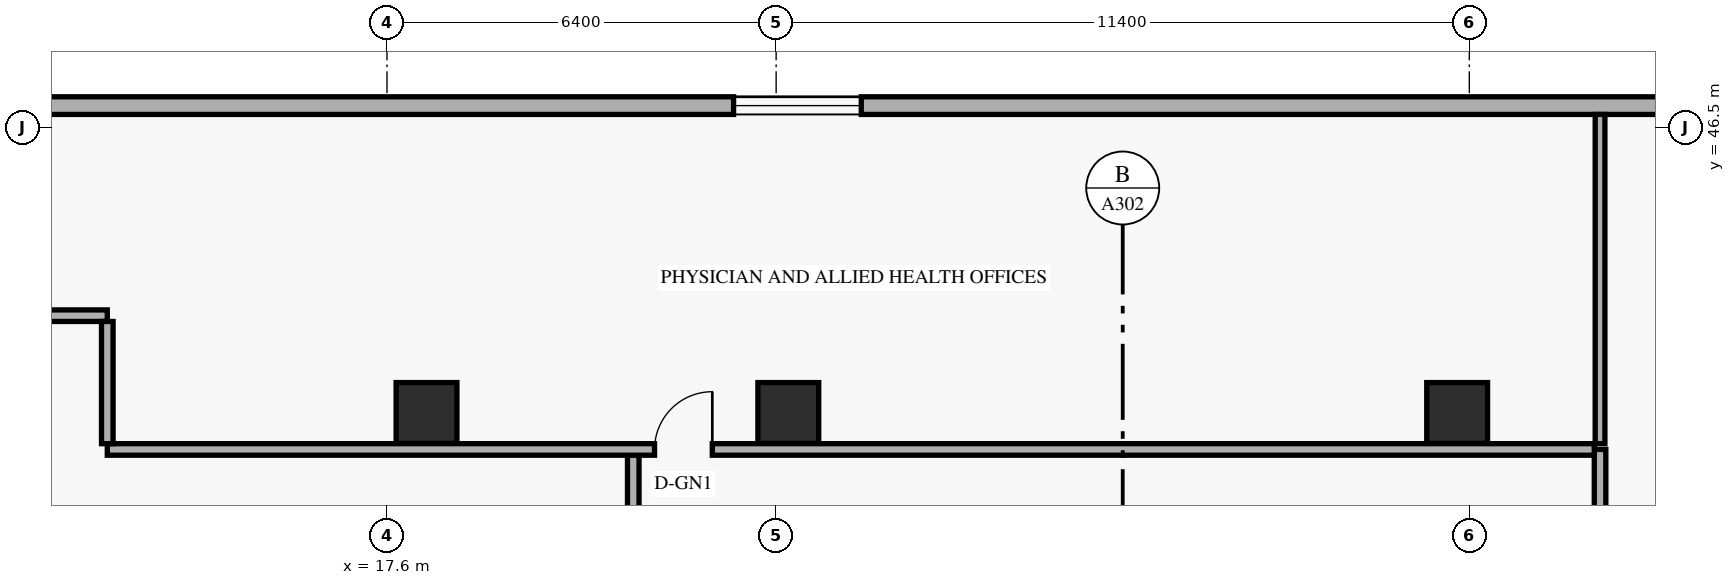
"""IFC4 building model, lengths in metres.
Left out: names, types, materials, properties, quantities, classifications, styles, units other than length and angle.
Written with IfcOpenShell. Run it as: python <this file> out.ifc"""

import sys

from ifc_helpers import new_model, si_unit, direction, frame, frame_2d, origin, origin_2d, place, context, subcontext, project, spatial, rectangle, extrude, element, fill, save


model = new_model("IFC4")
c1 = context("Model", 3, precision=1e-05, world=origin(), true_north=direction((0.0, 1.0)))
c2 = subcontext(c1, "Body", "Model", "MODEL_VIEW")
j1 = project(units=[si_unit("LENGTHUNIT", "METRE"), si_unit("PLANEANGLEUNIT", "RADIAN")], contexts=[c1])
p1 = place(None, origin())
s1 = spatial("IfcSite", under=j1, at=p1, CompositionType="ELEMENT")
p2 = place(p1, origin())
s2 = spatial("IfcBuilding", under=s1, at=p2, CompositionType="ELEMENT")
p3 = place(p2, frame((0.0, 0.0, 19.2)))
s3 = spatial("IfcBuildingStorey", under=s2, at=p3, CompositionType="ELEMENT", Elevation=19.2)
for number, where, z_axis, x_axis in (
    (1, (18.25, 41.8, 0.0), (0.0, 0.0, 1.0), (1.0, 0.0, 0.0)),
    (2, (24.2, 41.8, 0.0), (0.0, 0.0, 1.0), (1.0, 0.0, 0.0)),
    (3, (35.2, 41.8, 0.0), (0.0, 0.0, 1.0), (1.0, 0.0, 0.0)),
):
    element("IfcColumn", number, at=place(p3, frame(where, z_axis=z_axis, x_axis=x_axis)), inside=s3, PredefinedType="COLUMN", context=c2, shape_type="SweptSolid", body=[
        extrude(rectangle(XDim=1.0, YDim=1.0, at=origin_2d()), origin(), (0.0, 0.0, 1.0), 4.8),
    ])
p4 = place(p3, frame((44.98, 46.855, 0.0), z_axis=(0.0, 0.0, 1.0), x_axis=(-1.0, 0.0, 0.0)))
e4 = element("IfcWall", 4, at=p4, inside=s3, PredefinedType="SOLIDWALL", context=c2, shape_type="SweptSolid", body=[
    extrude(rectangle(XDim=39.56, YDim=0.29, at=frame_2d((19.78, 0.0))), origin(), (0.0, 0.0, 1.0), 4.5),
])
p5 = place(p4, frame((35.645, 0.0, 0.85)))
e5 = element("IfcOpeningElement", 5, at=p5, cuts=e4, PredefinedType="OPENING", context=c2, shape_type="SweptSolid", body=[
    extrude(rectangle(XDim=2.1, YDim=1.75, at=frame_2d((1.05, 0.875))), frame((0.0, 0.155, 0.0), z_axis=(0.0, -1.0, 0.0), x_axis=(1.0, 0.0, 0.0)), (0.0, 0.0, 1.0), 0.31),
])
p6 = place(p4, frame((19.58, 0.0, 0.85)))
e6 = element("IfcOpeningElement", 6, at=p6, cuts=e4, PredefinedType="OPENING", context=c2, shape_type="SweptSolid", body=[
    extrude(rectangle(XDim=2.1, YDim=1.75, at=frame_2d((1.05, 0.875))), frame((0.0, 0.155, 0.0), z_axis=(0.0, -1.0, 0.0), x_axis=(1.0, 0.0, 0.0)), (0.0, 0.0, 1.0), 0.31),
])
p7 = place(p4, frame((2.665, 0.0, 0.85)))
e7 = element("IfcOpeningElement", 7, at=p7, cuts=e4, PredefinedType="OPENING", context=c2, shape_type="SweptSolid", body=[
    extrude(rectangle(XDim=2.1, YDim=1.75, at=frame_2d((1.05, 0.875))), frame((0.0, 0.155, 0.0), z_axis=(0.0, -1.0, 0.0), x_axis=(1.0, 0.0, 0.0)), (0.0, 0.0, 1.0), 0.31),
])
p8 = place(p3, frame((21.65, 6.8, 0.0), z_axis=(0.0, 0.0, 1.0), x_axis=(0.0, 1.0, 0.0)))
e8 = element("IfcWall", 8, at=p8, inside=s3, PredefinedType="STANDARD", context=c2, shape_type="SweptSolid", body=[
    extrude(rectangle(XDim=34.4, YDim=0.19, at=frame_2d((17.2, 0.0))), origin(), (0.0, 0.0, 1.0), 3.555),
])
p9 = place(p8, frame((22.48, 0.0, 0.0)))
e9 = element("IfcOpeningElement", 9, at=p9, cuts=e8, PredefinedType="OPENING", context=c2, shape_type="SweptSolid", body=[
    extrude(rectangle(XDim=0.92, YDim=2.14, at=frame_2d((0.46, 1.07))), frame((0.0, 0.105, 0.0), z_axis=(0.0, -1.0, 0.0), x_axis=(1.0, 0.0, 0.0)), (0.0, 0.0, 1.0), 0.21),
])
p10 = place(p8, frame((28.2, 0.0, 0.0)))
e10 = element("IfcOpeningElement", 10, at=p10, cuts=e8, PredefinedType="OPENING", context=c2, shape_type="SweptSolid", body=[
    extrude(rectangle(XDim=0.95, YDim=2.15, at=frame_2d((0.475, 1.075))), frame((0.0, 0.105, 0.0), z_axis=(0.0, -1.0, 0.0), x_axis=(1.0, 0.0, 0.0)), (0.0, 0.0, 1.0), 0.21),
])
p11 = place(p8, frame((6.0, 0.0, 0.0)))
e11 = element("IfcOpeningElement", 11, at=p11, cuts=e8, PredefinedType="OPENING", context=c2, shape_type="SweptSolid", body=[
    extrude(rectangle(XDim=0.9, YDim=2.1, at=frame_2d((0.45, 1.05))), frame((0.0, 0.105, 0.0), z_axis=(0.0, -1.0, 0.0), x_axis=(1.0, 0.0, 0.0)), (0.0, 0.0, 1.0), 0.21),
])
p12 = place(p3, frame((37.55, 6.8, 0.0), z_axis=(0.0, 0.0, 1.0), x_axis=(0.0, 1.0, 0.0)))
e12 = element("IfcWall", 12, at=p12, inside=s3, PredefinedType="STANDARD", context=c2, shape_type="SweptSolid", body=[
    extrude(rectangle(XDim=34.4, YDim=0.19, at=frame_2d((17.2, 0.0))), origin(), (0.0, 0.0, 1.0), 3.555),
])
p13 = place(p12, frame((3.0, 0.0, 0.0)))
e13 = element("IfcOpeningElement", 13, at=p13, cuts=e12, PredefinedType="OPENING", context=c2, shape_type="SweptSolid", body=[
    extrude(rectangle(XDim=1.05, YDim=2.15, at=frame_2d((0.525, 1.075))), frame((0.0, 0.105, 0.0), z_axis=(0.0, -1.0, 0.0), x_axis=(1.0, 0.0, 0.0)), (0.0, 0.0, 1.0), 0.21),
])
p14 = place(p12, frame((19.617, 0.0, 0.0)))
e14 = element("IfcOpeningElement", 14, at=p14, cuts=e12, PredefinedType="OPENING", context=c2, shape_type="SweptSolid", body=[
    extrude(rectangle(XDim=1.2, YDim=2.15, at=frame_2d((0.6, 1.075))), frame((0.0, 0.105, 0.0), z_axis=(0.0, -1.0, 0.0), x_axis=(1.0, 0.0, 0.0)), (0.0, 0.0, 1.0), 0.21),
])
p15 = place(p12, frame((30.79, 0.0, 0.0)))
e15 = element("IfcOpeningElement", 15, at=p15, cuts=e12, PredefinedType="OPENING", context=c2, shape_type="SweptSolid", body=[
    extrude(rectangle(XDim=1.05, YDim=2.15, at=frame_2d((0.525, 1.075))), frame((0.0, 0.105, 0.0), z_axis=(0.0, -1.0, 0.0), x_axis=(1.0, 0.0, 0.0)), (0.0, 0.0, 1.0), 0.21),
])
p16 = place(p3, frame((13.0, 41.2, 0.0), z_axis=(0.0, 0.0, 1.0), x_axis=(1.0, 0.0, 0.0)))
e16 = element("IfcWall", 16, at=p16, inside=s3, PredefinedType="STANDARD", context=c2, shape_type="SweptSolid", body=[
    extrude(rectangle(XDim=24.455, YDim=0.19, at=frame_2d((12.228, 0.0))), origin(), (0.0, 0.0, 1.0), 3.712),
])
p17 = place(p16, frame((9.0, 0.0, 0.0)))
e17 = element("IfcOpeningElement", 17, at=p17, cuts=e16, PredefinedType="OPENING", context=c2, shape_type="SweptSolid", body=[
    extrude(rectangle(XDim=0.95, YDim=2.15, at=frame_2d((0.475, 1.075))), frame((0.0, 0.105, 0.0), z_axis=(0.0, -1.0, 0.0), x_axis=(1.0, 0.0, 0.0)), (0.0, 0.0, 1.0), 0.21),
])
p18 = place(p3, frame((11.15, 43.4, 0.0), z_axis=(0.0, 0.0, 1.0), x_axis=(1.0, 0.0, 0.0)))
e18 = element("IfcWall", 18, at=p18, inside=s3, PredefinedType="STANDARD", context=c2, shape_type="SweptSolid", body=[
    extrude(rectangle(XDim=1.85, YDim=0.19, at=frame_2d((0.925, 0.0))), origin(), (0.0, 0.0, 1.0), 4.5),
])
p19 = place(p3, frame((13.0, 41.295, 0.0), z_axis=(0.0, 0.0, 1.0), x_axis=(0.0, 1.0, 0.0)))
e19 = element("IfcWall", 19, at=p19, inside=s3, PredefinedType="STANDARD", context=c2, shape_type="SweptSolid", body=[
    extrude(rectangle(XDim=2.01, YDim=0.19, at=frame_2d((1.005, 0.0))), origin(), (0.0, 0.0, 1.0), 3.949),
])
p20 = place(p3, frame((37.55, 41.295, 0.0), z_axis=(0.0, 0.0, 1.0), x_axis=(0.0, 1.0, 0.0)))
e20 = element("IfcWall", 20, at=p20, inside=s3, PredefinedType="PARTITIONING", context=c2, shape_type="SweptSolid", body=[
    extrude(rectangle(XDim=5.415, YDim=0.16, at=frame_2d((2.708, 0.0))), origin(), (0.0, 0.0, 1.0), 3.949),
])
p21 = place(p6, origin())
e21 = element("IfcWindow", 21, at=p21, inside=s3, PartitioningType="SINGLE_PANEL", PredefinedType="WINDOW", context=c2, shape_type="SweptSolid", body=[
    extrude(rectangle(XDim=2.1, YDim=1.75, at=frame_2d((1.05, 0.875))), frame((0.0, 0.03, 0.0), z_axis=(0.0, -1.0, 0.0), x_axis=(1.0, 0.0, 0.0)), (0.0, 0.0, 1.0), 0.06),
])
fill(e6, e21)
p22 = place(p17, origin())
e22 = element("IfcDoor", 22, at=p22, inside=s3, OperationType="SINGLE_SWING_RIGHT", PredefinedType="DOOR", context=c2, shape_type="SweptSolid", body=[
    extrude(rectangle(XDim=0.95, YDim=2.15, at=frame_2d((0.475, 1.075))), frame((0.0, 0.025, 0.0), z_axis=(0.0, -1.0, 0.0), x_axis=(1.0, 0.0, 0.0)), (0.0, 0.0, 1.0), 0.05),
])
fill(e17, e22)
save(model, sys.argv[1])
